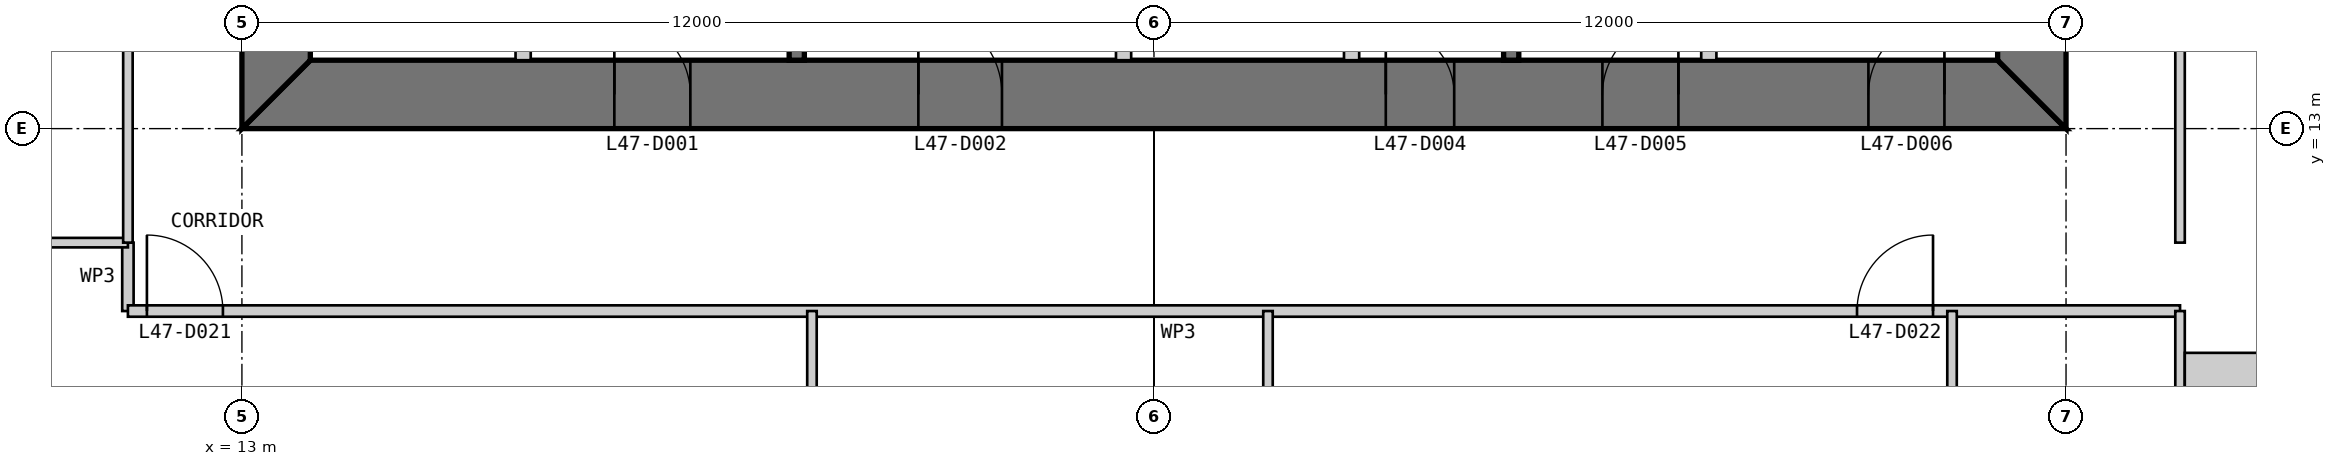
"""IFC4 building model, lengths in metres.
Left out: names, types, materials, properties, quantities, classifications, styles, units other than length and angle.
Written with IfcOpenShell. Run it as: python <this file> out.ifc"""

import sys

from ifc_helpers import new_model, si_unit, direction, frame, frame_2d, origin, place, context, subcontext, project, spatial, polyline, rectangle, outline, extrude, element, fill, save


model = new_model("IFC4")
c1 = context("Model", 3, precision=1e-05, world=origin(), true_north=direction((0.0, 1.0)))
c2 = subcontext(c1, "Body", "Model", "MODEL_VIEW")
j1 = project(units=[si_unit("LENGTHUNIT", "METRE"), si_unit("PLANEANGLEUNIT", "RADIAN")], contexts=[c1])
p1 = place(None, origin())
s1 = spatial("IfcSite", under=j1, at=p1, CompositionType="ELEMENT")
p2 = place(p1, origin())
s2 = spatial("IfcBuilding", under=s1, at=p2, CompositionType="ELEMENT")
p3 = place(p2, frame((0.0, 0.0, 201.8)))
s3 = spatial("IfcBuildingStorey", under=s2, at=p3, CompositionType="ELEMENT", Elevation=201.8)
p4 = place(p3, frame((13.0, 13.45, 0.0), z_axis=(0.0, 0.0, 1.0), x_axis=(1.0, 0.0, 0.0)))
e1 = element("IfcWall", 1, at=p4, inside=s3, PredefinedType="SHEAR", context=c2, shape_type="SweptSolid", body=[
    extrude(outline(polyline([(0.0, -0.45), (24.0, -0.45), (23.1, 0.45), (0.9, 0.45), (0.0, -0.45)])), origin(), (0.0, 0.0, 1.0), 4.0),
])
p5 = place(p4, frame((4.9, 0.0, 0.0)))
e2 = element("IfcOpeningElement", 2, at=p5, cuts=e1, PredefinedType="OPENING", context=c2, shape_type="SweptSolid", body=[
    extrude(rectangle(XDim=1.0, YDim=2.2, at=frame_2d((0.5, 1.1))), frame((0.0, 0.46, 0.0), z_axis=(0.0, -1.0, 0.0), x_axis=(1.0, 0.0, 0.0)), (0.0, 0.0, 1.0), 0.92),
])
p6 = place(p4, frame((8.9, 0.0, 0.0)))
e3 = element("IfcOpeningElement", 3, at=p6, cuts=e1, PredefinedType="OPENING", context=c2, shape_type="SweptSolid", body=[
    extrude(rectangle(XDim=1.1, YDim=2.2, at=frame_2d((0.55, 1.1))), frame((0.0, 0.46, 0.0), z_axis=(0.0, -1.0, 0.0), x_axis=(1.0, 0.0, 0.0)), (0.0, 0.0, 1.0), 0.92),
])
p7 = place(p4, frame((15.05, 0.0, 0.0)))
e4 = element("IfcOpeningElement", 4, at=p7, cuts=e1, PredefinedType="OPENING", context=c2, shape_type="SweptSolid", body=[
    extrude(rectangle(XDim=0.9, YDim=2.2, at=frame_2d((0.45, 1.1))), frame((0.0, 0.46, 0.0), z_axis=(0.0, -1.0, 0.0), x_axis=(1.0, 0.0, 0.0)), (0.0, 0.0, 1.0), 0.92),
])
p8 = place(p4, frame((17.9, 0.0, 0.0)))
e5 = element("IfcOpeningElement", 5, at=p8, cuts=e1, PredefinedType="OPENING", context=c2, shape_type="SweptSolid", body=[
    extrude(rectangle(XDim=1.0, YDim=2.2, at=frame_2d((0.5, 1.1))), frame((0.0, 0.46, 0.0), z_axis=(0.0, -1.0, 0.0), x_axis=(1.0, 0.0, 0.0)), (0.0, 0.0, 1.0), 0.92),
])
p9 = place(p4, frame((21.4, 0.0, 0.0)))
e6 = element("IfcOpeningElement", 6, at=p9, cuts=e1, PredefinedType="OPENING", context=c2, shape_type="SweptSolid", body=[
    extrude(rectangle(XDim=1.0, YDim=2.2, at=frame_2d((0.5, 1.1))), frame((0.0, 0.46, 0.0), z_axis=(0.0, -1.0, 0.0), x_axis=(1.0, 0.0, 0.0)), (0.0, 0.0, 1.0), 0.92),
])
p10 = place(p3, frame((36.55, 13.9, 0.0), z_axis=(0.0, 0.0, 1.0), x_axis=(0.0, 1.0, 0.0)))
e7 = element("IfcWall", 7, at=p10, inside=s3, PredefinedType="SHEAR", context=c2, shape_type="SweptSolid", body=[
    extrude(outline(polyline([(-0.9, -0.45), (23.1, -0.45), (22.2, 0.45), (0.0, 0.45), (-0.9, -0.45)])), origin(), (0.0, 0.0, 1.0), 4.0),
])
p11 = place(p10, frame((20.2, 0.0, 0.0)))
e8 = element("IfcOpeningElement", 8, at=p11, cuts=e7, PredefinedType="OPENING", context=c2, shape_type="SweptSolid", body=[
    extrude(rectangle(XDim=1.0, YDim=2.2, at=frame_2d((0.5, 1.1))), frame((0.0, 0.46, 0.0), z_axis=(0.0, -1.0, 0.0), x_axis=(1.0, 0.0, 0.0)), (0.0, 0.0, 1.0), 0.92),
])
p12 = place(p10, frame((17.25, 0.0, 0.0)))
e9 = element("IfcOpeningElement", 9, at=p12, cuts=e7, PredefinedType="OPENING", context=c2, shape_type="SweptSolid", body=[
    extrude(rectangle(XDim=0.9, YDim=2.2, at=frame_2d((0.45, 1.1))), frame((0.0, 0.46, 0.0), z_axis=(0.0, -1.0, 0.0), x_axis=(1.0, 0.0, 0.0)), (0.0, 0.0, 1.0), 0.92),
])
p13 = place(p3, frame((13.45, 36.1, 0.0), z_axis=(0.0, 0.0, 1.0), x_axis=(0.0, -1.0, 0.0)))
e10 = element("IfcWall", 10, at=p13, inside=s3, PredefinedType="SHEAR", context=c2, shape_type="SweptSolid", body=[
    extrude(outline(polyline([(-0.9, -0.45), (23.1, -0.45), (22.2, 0.45), (0.0, 0.45), (-0.9, -0.45)])), origin(), (0.0, 0.0, 1.0), 4.0),
])
p14 = place(p13, frame((20.2, 0.0, 0.0)))
e11 = element("IfcOpeningElement", 11, at=p14, cuts=e10, PredefinedType="OPENING", context=c2, shape_type="SweptSolid", body=[
    extrude(rectangle(XDim=1.0, YDim=2.2, at=frame_2d((0.5, 1.1))), frame((0.0, 0.46, 0.0), z_axis=(0.0, -1.0, 0.0), x_axis=(1.0, 0.0, 0.0)), (0.0, 0.0, 1.0), 0.92),
])
p15 = place(p13, frame((17.25, 0.0, 0.0)))
e12 = element("IfcOpeningElement", 12, at=p15, cuts=e10, PredefinedType="OPENING", context=c2, shape_type="SweptSolid", body=[
    extrude(rectangle(XDim=0.9, YDim=2.2, at=frame_2d((0.45, 1.1))), frame((0.0, 0.46, 0.0), z_axis=(0.0, -1.0, 0.0), x_axis=(1.0, 0.0, 0.0)), (0.0, 0.0, 1.0), 0.92),
])
p16 = place(p3, frame((16.7, 13.9, 0.0), z_axis=(0.0, 0.0, 1.0), x_axis=(0.0, 1.0, 0.0)))
e13 = element("IfcWall", 13, at=p16, inside=s3, PredefinedType="PARTITIONING", context=c2, shape_type="SweptSolid", body=[
    extrude(rectangle(XDim=16.1, YDim=0.2, at=frame_2d((8.05, 0.0))), origin(), (0.0, 0.0, 1.0), 3.8),
])
p17 = place(p16, frame((7.95, 0.0, 0.0)))
e14 = element("IfcOpeningElement", 14, at=p17, cuts=e13, PredefinedType="OPENING", context=c2, shape_type="SweptSolid", body=[
    extrude(rectangle(XDim=0.9, YDim=2.2, at=frame_2d((0.45, 1.1))), frame((0.0, 0.11, 0.0), z_axis=(0.0, -1.0, 0.0), x_axis=(1.0, 0.0, 0.0)), (0.0, 0.0, 1.0), 0.22),
])
p18 = place(p16, frame((13.3, 0.0, 0.0)))
e15 = element("IfcOpeningElement", 15, at=p18, cuts=e13, PredefinedType="OPENING", context=c2, shape_type="SweptSolid", body=[
    extrude(rectangle(XDim=0.9, YDim=2.2, at=frame_2d((0.45, 1.1))), frame((0.0, 0.11, 0.0), z_axis=(0.0, -1.0, 0.0), x_axis=(1.0, 0.0, 0.0)), (0.0, 0.0, 1.0), 0.22),
])
p19 = place(p3, frame((20.3, 13.9, 0.0), z_axis=(0.0, 0.0, 1.0), x_axis=(0.0, 1.0, 0.0)))
e16 = element("IfcWall", 16, at=p19, inside=s3, PredefinedType="SOLIDWALL", context=c2, shape_type="SweptSolid", body=[
    extrude(rectangle(XDim=16.1, YDim=0.2, at=frame_2d((8.05, 0.0))), origin(), (0.0, 0.0, 1.0), 3.8),
])
p20 = place(p19, frame((6.4, 0.0, 0.0)))
e17 = element("IfcOpeningElement", 17, at=p20, cuts=e16, PredefinedType="OPENING", context=c2, shape_type="SweptSolid", body=[
    extrude(rectangle(XDim=0.9, YDim=2.2, at=frame_2d((0.45, 1.1))), frame((0.0, 0.11, 0.0), z_axis=(0.0, -1.0, 0.0), x_axis=(1.0, 0.0, 0.0)), (0.0, 0.0, 1.0), 0.22),
])
p21 = place(p19, frame((11.4, 0.0, 0.0)))
e18 = element("IfcOpeningElement", 18, at=p21, cuts=e16, PredefinedType="OPENING", context=c2, shape_type="SweptSolid", body=[
    extrude(rectangle(XDim=0.9, YDim=2.2, at=frame_2d((0.45, 1.1))), frame((0.0, 0.11, 0.0), z_axis=(0.0, -1.0, 0.0), x_axis=(1.0, 0.0, 0.0)), (0.0, 0.0, 1.0), 0.22),
])
p22 = place(p3, frame((24.6, 13.9, 0.0), z_axis=(0.0, 0.0, 1.0), x_axis=(0.0, 1.0, 0.0)))
e19 = element("IfcWall", 19, at=p22, inside=s3, PredefinedType="PARTITIONING", context=c2, shape_type="SweptSolid", body=[
    extrude(rectangle(XDim=3.3, YDim=0.2, at=frame_2d((1.65, 0.0))), origin(), (0.0, 0.0, 1.0), 3.8),
])
p23 = place(p22, frame((0.9, 0.0, 0.0)))
e20 = element("IfcOpeningElement", 20, at=p23, cuts=e19, PredefinedType="OPENING", context=c2, shape_type="SweptSolid", body=[
    extrude(rectangle(XDim=1.1, YDim=2.2, at=frame_2d((0.55, 1.1))), frame((0.0, 0.11, 0.0), z_axis=(0.0, -1.0, 0.0), x_axis=(1.0, 0.0, 0.0)), (0.0, 0.0, 1.0), 0.22),
])
p24 = place(p3, frame((27.6, 13.9, 0.0), z_axis=(0.0, 0.0, 1.0), x_axis=(0.0, 1.0, 0.0)))
e21 = element("IfcWall", 21, at=p24, inside=s3, PredefinedType="PARTITIONING", context=c2, shape_type="SweptSolid", body=[
    extrude(rectangle(XDim=3.3, YDim=0.2, at=frame_2d((1.65, 0.0))), origin(), (0.0, 0.0, 1.0), 3.8),
])
p25 = place(p3, frame((29.7, 13.9, 0.0), z_axis=(0.0, 0.0, 1.0), x_axis=(0.0, 1.0, 0.0)))
e22 = element("IfcWall", 22, at=p25, inside=s3, PredefinedType="SOLIDWALL", context=c2, shape_type="SweptSolid", body=[
    extrude(rectangle(XDim=6.1, YDim=0.2, at=frame_2d((3.05, 0.0))), origin(), (0.0, 0.0, 1.0), 3.8),
])
p26 = place(p3, frame((32.3, 13.9, 0.0), z_axis=(0.0, 0.0, 1.0), x_axis=(0.0, 1.0, 0.0)))
e23 = element("IfcWall", 23, at=p26, inside=s3, PredefinedType="PARTITIONING", context=c2, shape_type="SweptSolid", body=[
    extrude(rectangle(XDim=6.1, YDim=0.2, at=frame_2d((3.05, 0.0))), origin(), (0.0, 0.0, 1.0), 3.8),
])
p27 = place(p3, frame((11.5, 11.5, 0.0), z_axis=(0.0, 0.0, 1.0), x_axis=(0.0, -1.0, 0.0)))
e24 = element("IfcWall", 24, at=p27, inside=s3, PredefinedType="PARTITIONING", context=c2, shape_type="SweptSolid", body=[
    extrude(rectangle(XDim=0.9, YDim=0.15, at=frame_2d((0.45, 0.0))), origin(), (0.0, 0.0, 1.0), 3.85),
])
p28 = place(p3, frame((11.5, 10.6, 0.0), z_axis=(0.0, 0.0, 1.0), x_axis=(1.0, 0.0, 0.0)))
e25 = element("IfcWall", 25, at=p28, inside=s3, PredefinedType="PARTITIONING", context=c2, shape_type="SweptSolid", body=[
    extrude(rectangle(XDim=27.0, YDim=0.15, at=frame_2d((13.5, 0.0))), origin(), (0.0, 0.0, 1.0), 3.85),
])
p29 = place(p28, frame((0.25, 0.0, 0.0)))
e26 = element("IfcOpeningElement", 26, at=p29, cuts=e25, PredefinedType="OPENING", context=c2, shape_type="SweptSolid", body=[
    extrude(rectangle(XDim=1.0, YDim=2.2, at=frame_2d((0.5, 1.1))), frame((0.0, 0.085, 0.0), z_axis=(0.0, -1.0, 0.0), x_axis=(1.0, 0.0, 0.0)), (0.0, 0.0, 1.0), 0.17),
])
p30 = place(p28, frame((22.75, 0.0, 0.0)))
e27 = element("IfcOpeningElement", 27, at=p30, cuts=e25, PredefinedType="OPENING", context=c2, shape_type="SweptSolid", body=[
    extrude(rectangle(XDim=1.0, YDim=2.2, at=frame_2d((0.5, 1.1))), frame((0.0, 0.085, 0.0), z_axis=(0.0, -1.0, 0.0), x_axis=(1.0, 0.0, 0.0)), (0.0, 0.0, 1.0), 0.17),
])
p31 = place(p3, frame((0.15, 11.5, 0.0), z_axis=(0.0, 0.0, 1.0), x_axis=(1.0, 0.0, 0.0)))
e28 = element("IfcWall", 28, at=p31, inside=s3, PredefinedType="PARTITIONING", context=c2, shape_type="SweptSolid", body=[
    extrude(rectangle(XDim=11.35, YDim=0.125, at=frame_2d((5.675, 0.0))), origin(), (0.0, 0.0, 1.0), 3.85),
])
p32 = place(p3, frame((20.5, 4.0, 0.0), z_axis=(0.0, 0.0, 1.0), x_axis=(0.0, 1.0, 0.0)))
e29 = element("IfcWall", 29, at=p32, inside=s3, PredefinedType="PARTITIONING", context=c2, shape_type="SweptSolid", body=[
    extrude(rectangle(XDim=6.6, YDim=0.125, at=frame_2d((3.3, 0.0))), origin(), (0.0, 0.0, 1.0), 3.85),
])
p33 = place(p3, frame((26.5, 4.0, 0.0), z_axis=(0.0, 0.0, 1.0), x_axis=(0.0, 1.0, 0.0)))
e30 = element("IfcWall", 30, at=p33, inside=s3, PredefinedType="PARTITIONING", context=c2, shape_type="SweptSolid", body=[
    extrude(rectangle(XDim=6.6, YDim=0.125, at=frame_2d((3.3, 0.0))), origin(), (0.0, 0.0, 1.0), 3.85),
])
p34 = place(p33, frame((2.8, 0.0, 0.0)))
e31 = element("IfcOpeningElement", 31, at=p34, cuts=e30, PredefinedType="OPENING", context=c2, shape_type="SweptSolid", body=[
    extrude(rectangle(XDim=1.0, YDim=2.2, at=frame_2d((0.5, 1.1))), frame((0.0, 0.073, 0.0), z_axis=(0.0, -1.0, 0.0), x_axis=(1.0, 0.0, 0.0)), (0.0, 0.0, 1.0), 0.145),
])
p35 = place(p3, frame((35.5, 4.0, 0.0), z_axis=(0.0, 0.0, 1.0), x_axis=(0.0, 1.0, 0.0)))
e32 = element("IfcWall", 32, at=p35, inside=s3, PredefinedType="PARTITIONING", context=c2, shape_type="SweptSolid", body=[
    extrude(rectangle(XDim=6.6, YDim=0.125, at=frame_2d((3.3, 0.0))), origin(), (0.0, 0.0, 1.0), 3.85),
])
p36 = place(p35, frame((2.85, 0.0, 0.0)))
e33 = element("IfcOpeningElement", 33, at=p36, cuts=e32, PredefinedType="OPENING", context=c2, shape_type="SweptSolid", body=[
    extrude(rectangle(XDim=0.9, YDim=2.2, at=frame_2d((0.45, 1.1))), frame((0.0, 0.073, 0.0), z_axis=(0.0, -1.0, 0.0), x_axis=(1.0, 0.0, 0.0)), (0.0, 0.0, 1.0), 0.145),
])
p37 = place(p3, frame((38.5, 0.15, 0.0), z_axis=(0.0, 0.0, 1.0), x_axis=(0.0, 1.0, 0.0)))
e34 = element("IfcWall", 34, at=p37, inside=s3, PredefinedType="PARTITIONING", context=c2, shape_type="SweptSolid", body=[
    extrude(rectangle(XDim=10.45, YDim=0.125, at=frame_2d((5.225, 0.0))), origin(), (0.0, 0.0, 1.0), 3.85),
])
for number, where, z_axis, x_axis in (
    (35, (38.5, 11.5, 0.0), (0.0, 0.0, 1.0), (0.0, 1.0, 0.0)),
    (36, (11.5, 14.5, 0.0), (0.0, 0.0, 1.0), (0.0, -1.0, 0.0)),
):
    element("IfcWall", number, at=place(p3, frame(where, z_axis=z_axis, x_axis=x_axis)), inside=s3, PredefinedType="PARTITIONING", context=c2, shape_type="SweptSolid", body=[
        extrude(rectangle(XDim=3.0, YDim=0.125, at=frame_2d((1.5, 0.0))), origin(), (0.0, 0.0, 1.0), 3.85),
    ])
p38 = place(p3, frame((38.562, 9.0, 0.0), z_axis=(0.0, 0.0, 1.0), x_axis=(1.0, 0.0, 0.0)))
e37 = element("IfcWall", 37, at=p38, inside=s3, PredefinedType="PARTITIONING", context=c2, shape_type="SweptSolid", body=[
    extrude(rectangle(XDim=1.438, YDim=2.1, at=frame_2d((0.719, 0.0))), origin(), (0.0, 0.0, 1.0), 3.85),
])
p39 = place(p5, origin())
e38 = element("IfcDoor", 38, at=p39, inside=s3, OperationType="SINGLE_SWING_LEFT", PredefinedType="DOOR", context=c2, shape_type="SweptSolid", body=[
    extrude(rectangle(XDim=1.0, YDim=2.2, at=frame_2d((0.5, 1.1))), frame((0.0, 0.025, 0.0), z_axis=(0.0, -1.0, 0.0), x_axis=(1.0, 0.0, 0.0)), (0.0, 0.0, 1.0), 0.05),
    extrude(outline(polyline([(0.0, 0.0), (0.04, 0.0), (0.04, 2.16), (0.96, 2.16), (0.96, 0.0), (1.0, 0.0), (1.0, 2.2), (0.0, 2.2), (0.0, 0.0)])), frame((0.0, 0.3, 0.0), z_axis=(0.0, -1.0, 0.0), x_axis=(1.0, 0.0, 0.0)), (0.0, 0.0, 1.0), 0.6),
])
fill(e2, e38)
p40 = place(p6, origin())
e39 = element("IfcDoor", 39, at=p40, inside=s3, OperationType="SINGLE_SWING_LEFT", PredefinedType="DOOR", context=c2, shape_type="SweptSolid", body=[
    extrude(rectangle(XDim=1.1, YDim=2.2, at=frame_2d((0.55, 1.1))), frame((0.0, 0.025, 0.0), z_axis=(0.0, -1.0, 0.0), x_axis=(1.0, 0.0, 0.0)), (0.0, 0.0, 1.0), 0.05),
    extrude(outline(polyline([(0.0, 0.0), (0.04, 0.0), (0.04, 2.16), (1.06, 2.16), (1.06, 0.0), (1.1, 0.0), (1.1, 2.2), (0.0, 2.2), (0.0, 0.0)])), frame((0.0, 0.3, 0.0), z_axis=(0.0, -1.0, 0.0), x_axis=(1.0, 0.0, 0.0)), (0.0, 0.0, 1.0), 0.6),
])
fill(e3, e39)
p41 = place(p7, origin())
e40 = element("IfcDoor", 40, at=p41, inside=s3, OperationType="SINGLE_SWING_LEFT", PredefinedType="DOOR", context=c2, shape_type="SweptSolid", body=[
    extrude(rectangle(XDim=0.9, YDim=2.2, at=frame_2d((0.45, 1.1))), frame((0.0, 0.025, 0.0), z_axis=(0.0, -1.0, 0.0), x_axis=(1.0, 0.0, 0.0)), (0.0, 0.0, 1.0), 0.05),
    extrude(outline(polyline([(0.0, 0.0), (0.04, 0.0), (0.04, 2.16), (0.86, 2.16), (0.86, 0.0), (0.9, 0.0), (0.9, 2.2), (0.0, 2.2), (0.0, 0.0)])), frame((0.0, 0.3, 0.0), z_axis=(0.0, -1.0, 0.0), x_axis=(1.0, 0.0, 0.0)), (0.0, 0.0, 1.0), 0.6),
])
fill(e4, e40)
p42 = place(p8, origin())
e41 = element("IfcDoor", 41, at=p42, inside=s3, OperationType="SINGLE_SWING_RIGHT", PredefinedType="DOOR", context=c2, shape_type="SweptSolid", body=[
    extrude(rectangle(XDim=1.0, YDim=2.2, at=frame_2d((0.5, 1.1))), frame((0.0, 0.025, 0.0), z_axis=(0.0, -1.0, 0.0), x_axis=(1.0, 0.0, 0.0)), (0.0, 0.0, 1.0), 0.05),
    extrude(outline(polyline([(0.0, 0.0), (0.04, 0.0), (0.04, 2.16), (0.96, 2.16), (0.96, 0.0), (1.0, 0.0), (1.0, 2.2), (0.0, 2.2), (0.0, 0.0)])), frame((0.0, 0.3, 0.0), z_axis=(0.0, -1.0, 0.0), x_axis=(1.0, 0.0, 0.0)), (0.0, 0.0, 1.0), 0.6),
])
fill(e5, e41)
p43 = place(p9, origin())
e42 = element("IfcDoor", 42, at=p43, inside=s3, OperationType="SINGLE_SWING_RIGHT", PredefinedType="DOOR", context=c2, shape_type="SweptSolid", body=[
    extrude(rectangle(XDim=1.0, YDim=2.2, at=frame_2d((0.5, 1.1))), frame((0.0, 0.025, 0.0), z_axis=(0.0, -1.0, 0.0), x_axis=(1.0, 0.0, 0.0)), (0.0, 0.0, 1.0), 0.05),
    extrude(outline(polyline([(0.0, 0.0), (0.04, 0.0), (0.04, 2.16), (0.96, 2.16), (0.96, 0.0), (1.0, 0.0), (1.0, 2.2), (0.0, 2.2), (0.0, 0.0)])), frame((0.0, 0.3, 0.0), z_axis=(0.0, -1.0, 0.0), x_axis=(1.0, 0.0, 0.0)), (0.0, 0.0, 1.0), 0.6),
])
fill(e6, e42)
p44 = place(p29, origin())
e43 = element("IfcDoor", 43, at=p44, inside=s3, OperationType="SINGLE_SWING_LEFT", PredefinedType="DOOR", context=c2, shape_type="SweptSolid", body=[
    extrude(rectangle(XDim=1.0, YDim=2.2, at=frame_2d((0.5, 1.1))), frame((0.0, 0.025, 0.0), z_axis=(0.0, -1.0, 0.0), x_axis=(1.0, 0.0, 0.0)), (0.0, 0.0, 1.0), 0.05),
])
fill(e26, e43)
p45 = place(p30, origin())
e44 = element("IfcDoor", 44, at=p45, inside=s3, OperationType="SINGLE_SWING_RIGHT", PredefinedType="DOOR", context=c2, shape_type="SweptSolid", body=[
    extrude(rectangle(XDim=1.0, YDim=2.2, at=frame_2d((0.5, 1.1))), frame((0.0, 0.025, 0.0), z_axis=(0.0, -1.0, 0.0), x_axis=(1.0, 0.0, 0.0)), (0.0, 0.0, 1.0), 0.05),
])
fill(e27, e44)
save(model, sys.argv[1])
